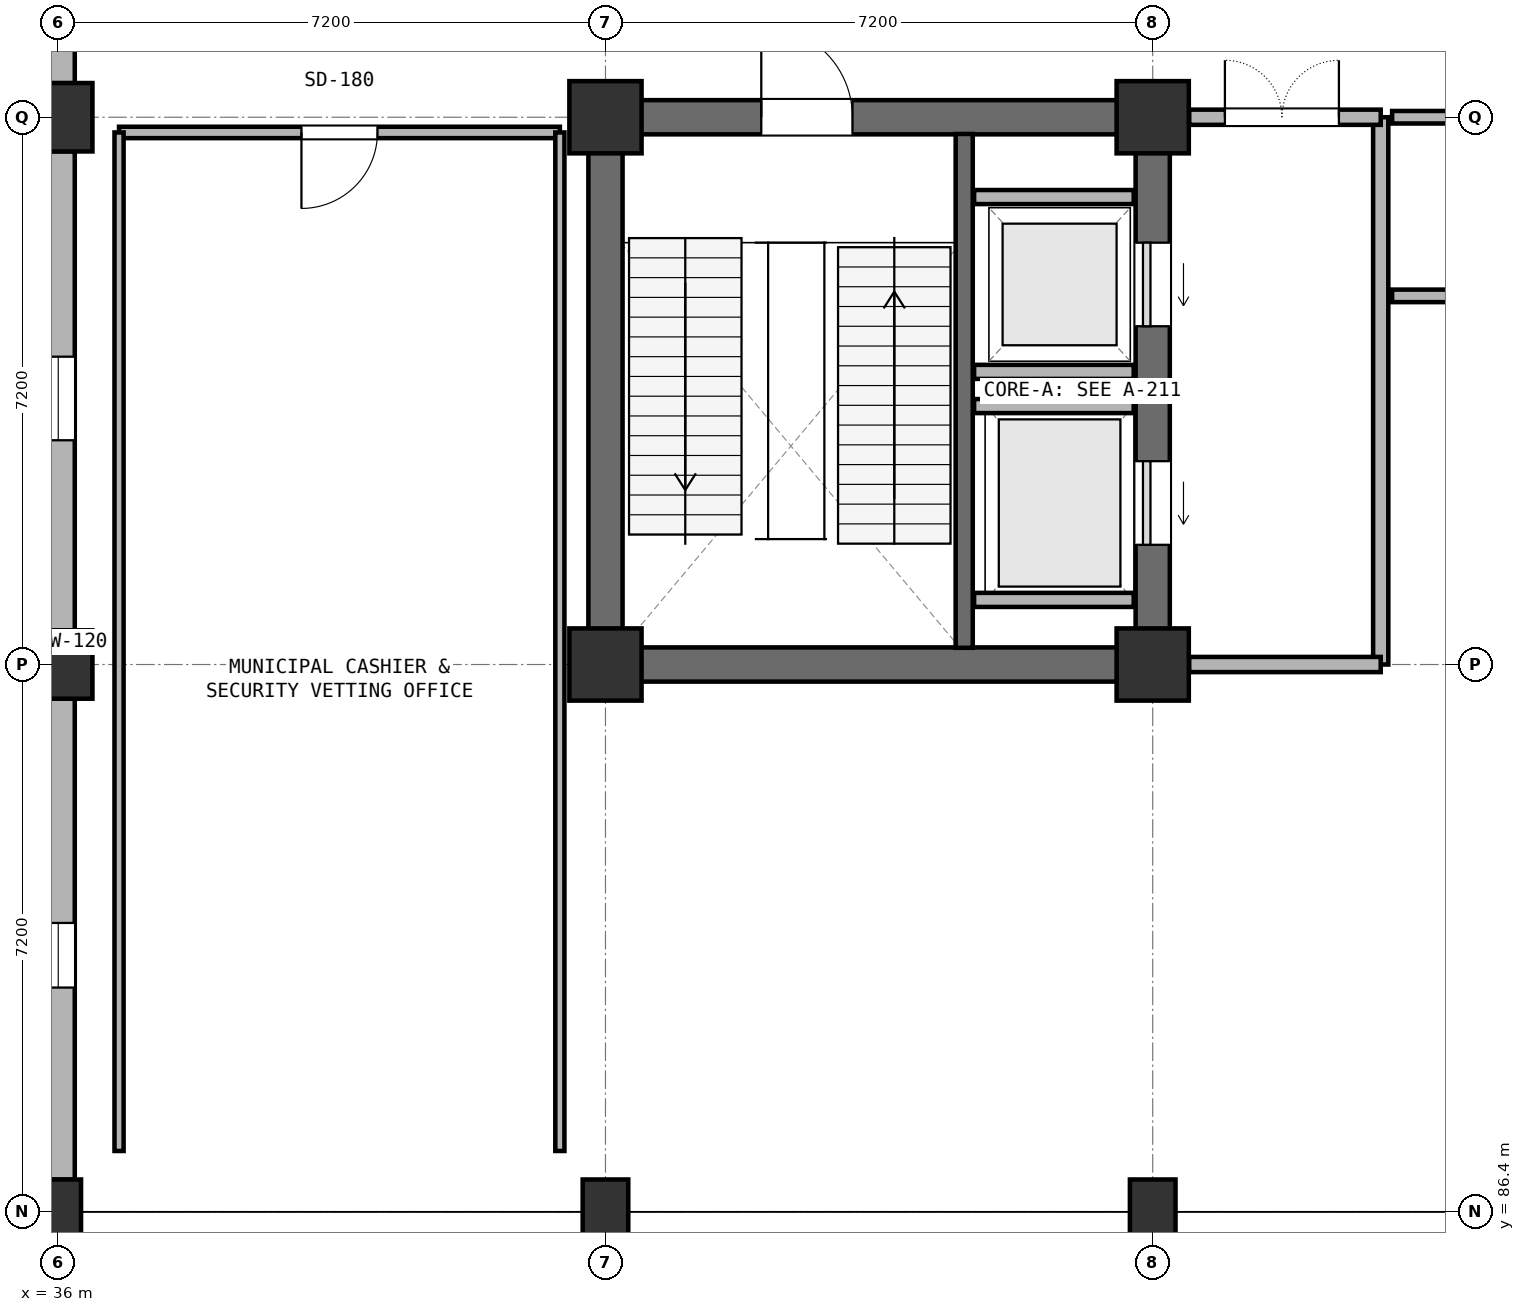
"""IFC4 building model, lengths in metres.
Left out: names, types, materials, properties, quantities, classifications, styles, units other than length and angle.
Written with IfcOpenShell. Run it as: python <this file> out.ifc"""

import sys

from ifc_helpers import new_model, si_unit, direction, frame, frame_2d, origin, origin_2d, place, context, subcontext, project, spatial, rectangle, extrude, element, fill, save


model = new_model("IFC4")
c1 = context("Model", 3, precision=1e-05, world=origin(), true_north=direction((0.0, 1.0)))
c2 = subcontext(c1, "Body", "Model", "MODEL_VIEW")
j1 = project(units=[si_unit("LENGTHUNIT", "METRE"), si_unit("PLANEANGLEUNIT", "RADIAN")], contexts=[c1])
p1 = place(None, origin())
s1 = spatial("IfcSite", under=j1, at=p1, CompositionType="ELEMENT")
p2 = place(p1, origin())
s2 = spatial("IfcBuilding", under=s1, at=p2, CompositionType="ELEMENT")
p3 = place(p2, origin())
s3 = spatial("IfcBuildingStorey", under=s2, at=p3, CompositionType="ELEMENT", Elevation=0.0)
p4 = place(p3, frame((36.0, 86.4, 0.0), z_axis=(0.0, 0.0, 1.0), x_axis=(1.0, 0.0, 0.0)))
e1 = element("IfcColumn", 1, at=p4, inside=s3, PredefinedType="COLUMN", context=c2, shape_type="SweptSolid", body=[
    extrude(rectangle(XDim=0.6, YDim=0.85, at=origin_2d()), origin(), (0.0, 0.0, 1.0), 5.4),
])
for number, where, z_axis, x_axis in (
    (2, (36.0, 93.6, 0.0), (0.0, 0.0, 1.0), (1.0, 0.0, 0.0)),
    (3, (36.0, 100.8, 0.0), (0.0, 0.0, 1.0), (1.0, 0.0, 0.0)),
):
    element("IfcColumn", number, at=place(p3, frame(where, z_axis=z_axis, x_axis=x_axis)), inside=s3, PredefinedType="COLUMN", context=c2, shape_type="SweptSolid", body=[
        extrude(rectangle(XDim=0.9, YDim=0.9, at=origin_2d()), origin(), (0.0, 0.0, 1.0), 5.4),
    ])
p5 = place(p3, frame((43.2, 86.4, 0.0), z_axis=(0.0, 0.0, 1.0), x_axis=(1.0, 0.0, 0.0)))
e4 = element("IfcColumn", 4, at=p5, inside=s3, PredefinedType="COLUMN", context=c2, shape_type="SweptSolid", body=[
    extrude(rectangle(XDim=0.6, YDim=0.85, at=origin_2d()), origin(), (0.0, 0.0, 1.0), 5.4),
])
for number, where, z_axis, x_axis in (
    (5, (43.2, 93.6, 0.0), (0.0, 0.0, 1.0), (1.0, 0.0, 0.0)),
    (6, (43.2, 100.8, 0.0), (0.0, 0.0, 1.0), (1.0, 0.0, 0.0)),
):
    element("IfcColumn", number, at=place(p3, frame(where, z_axis=z_axis, x_axis=x_axis)), inside=s3, PredefinedType="COLUMN", context=c2, shape_type="SweptSolid", body=[
        extrude(rectangle(XDim=0.95, YDim=0.95, at=origin_2d()), origin(), (0.0, 0.0, 1.0), 5.4),
    ])
p6 = place(p3, frame((50.4, 86.4, 0.0), z_axis=(0.0, 0.0, 1.0), x_axis=(1.0, 0.0, 0.0)))
e7 = element("IfcColumn", 7, at=p6, inside=s3, PredefinedType="COLUMN", context=c2, shape_type="SweptSolid", body=[
    extrude(rectangle(XDim=0.6, YDim=0.85, at=origin_2d()), origin(), (0.0, 0.0, 1.0), 5.4),
])
for number, where, z_axis, x_axis in (
    (8, (50.4, 93.6, 0.0), (0.0, 0.0, 1.0), (1.0, 0.0, 0.0)),
    (9, (50.4, 100.8, 0.0), (0.0, 0.0, 1.0), (1.0, 0.0, 0.0)),
):
    element("IfcColumn", number, at=place(p3, frame(where, z_axis=z_axis, x_axis=x_axis)), inside=s3, PredefinedType="COLUMN", context=c2, shape_type="SweptSolid", body=[
        extrude(rectangle(XDim=0.95, YDim=0.95, at=origin_2d()), origin(), (0.0, 0.0, 1.0), 5.4),
    ])
p7 = place(p3, frame((43.55, 93.6, 0.0), z_axis=(0.0, 0.0, 1.0), x_axis=(1.0, 0.0, 0.0)))
e10 = element("IfcWall", 10, at=p7, inside=s3, PredefinedType="SHEAR", context=c2, shape_type="SweptSolid", body=[
    extrude(rectangle(XDim=6.5, YDim=0.45, at=frame_2d((3.25, 0.0))), origin(), (0.0, 0.0, 1.0), 5.4),
])
p8 = place(p3, frame((50.4, 93.95, 0.0), z_axis=(0.0, 0.0, 1.0), x_axis=(0.0, 1.0, 0.0)))
e11 = element("IfcWall", 11, at=p8, inside=s3, PredefinedType="SHEAR", context=c2, shape_type="SweptSolid", body=[
    extrude(rectangle(XDim=6.5, YDim=0.45, at=frame_2d((3.25, 0.0))), origin(), (0.0, 0.0, 1.0), 5.4),
])
p9 = place(p8, frame((1.225, 0.0, 0.0)))
e12 = element("IfcOpeningElement", 12, at=p9, cuts=e11, PredefinedType="OPENING", context=c2, shape_type="SweptSolid", body=[
    extrude(rectangle(XDim=1.1, YDim=2.2, at=frame_2d((0.55, 1.1))), frame((0.0, 0.235, 0.0), z_axis=(0.0, -1.0, 0.0), x_axis=(1.0, 0.0, 0.0)), (0.0, 0.0, 1.0), 0.47),
])
p10 = place(p8, frame((4.1, 0.0, 0.0)))
e13 = element("IfcOpeningElement", 13, at=p10, cuts=e11, PredefinedType="OPENING", context=c2, shape_type="SweptSolid", body=[
    extrude(rectangle(XDim=1.1, YDim=2.2, at=frame_2d((0.55, 1.1))), frame((0.0, 0.235, 0.0), z_axis=(0.0, -1.0, 0.0), x_axis=(1.0, 0.0, 0.0)), (0.0, 0.0, 1.0), 0.47),
])
p11 = place(p3, frame((50.05, 100.8, 0.0), z_axis=(0.0, 0.0, 1.0), x_axis=(-1.0, 0.0, 0.0)))
e14 = element("IfcWall", 14, at=p11, inside=s3, PredefinedType="SHEAR", context=c2, shape_type="SweptSolid", body=[
    extrude(rectangle(XDim=6.5, YDim=0.45, at=frame_2d((3.25, 0.0))), origin(), (0.0, 0.0, 1.0), 5.4),
])
p12 = place(p11, frame((3.6, 0.0, 0.0)))
e15 = element("IfcOpeningElement", 15, at=p12, cuts=e14, PredefinedType="OPENING", context=c2, shape_type="SweptSolid", body=[
    extrude(rectangle(XDim=1.2, YDim=2.2, at=frame_2d((0.6, 1.1))), frame((0.0, 0.235, 0.0), z_axis=(0.0, -1.0, 0.0), x_axis=(1.0, 0.0, 0.0)), (0.0, 0.0, 1.0), 0.47),
])
p13 = place(p3, frame((43.2, 100.45, 0.0), z_axis=(0.0, 0.0, 1.0), x_axis=(0.0, -1.0, 0.0)))
e16 = element("IfcWall", 16, at=p13, inside=s3, PredefinedType="SHEAR", context=c2, shape_type="SweptSolid", body=[
    extrude(rectangle(XDim=6.5, YDim=0.45, at=frame_2d((3.25, 0.0))), origin(), (0.0, 0.0, 1.0), 5.4),
])
p14 = place(p3, frame((47.92, 93.82, 0.0), z_axis=(0.0, 0.0, 1.0), x_axis=(0.0, 1.0, 0.0)))
e17 = element("IfcWall", 17, at=p14, inside=s3, PredefinedType="SHEAR", context=c2, shape_type="SweptSolid", body=[
    extrude(rectangle(XDim=6.76, YDim=0.225, at=frame_2d((3.38, 0.0))), origin(), (0.0, 0.0, 1.0), 5.4),
])
for number, where, z_axis, x_axis in (
    (18, (48.05, 94.45, 0.0), (0.0, 0.0, 1.0), (1.0, 0.0, 0.0)),
    (19, (48.05, 97.0, 0.0), (0.0, 0.0, 1.0), (1.0, 0.0, 0.0)),
    (20, (48.05, 97.45, 0.0), (0.0, 0.0, 1.0), (1.0, 0.0, 0.0)),
    (21, (48.05, 99.75, 0.0), (0.0, 0.0, 1.0), (1.0, 0.0, 0.0)),
):
    element("IfcWall", number, at=place(p3, frame(where, z_axis=z_axis, x_axis=x_axis)), inside=s3, PredefinedType="PARTITIONING", context=c2, shape_type="SweptSolid", body=[
        extrude(rectangle(XDim=2.1, YDim=0.185, at=frame_2d((1.05, 0.0))), origin(), (0.0, 0.0, 1.0), 5.4),
    ])
p15 = place(p3, frame((36.0, 86.823, 0.0), z_axis=(0.0, 0.0, 1.0), x_axis=(0.0, 1.0, 0.0)))
e22 = element("IfcWall", 22, at=p15, inside=s3, PredefinedType="SOLIDWALL", context=c2, shape_type="SweptSolid", body=[
    extrude(rectangle(XDim=6.329, YDim=0.435, at=frame_2d((3.165, 0.0))), origin(), (0.0, 0.0, 1.0), 4.1),
])
p16 = place(p15, frame((2.527, 0.0, 0.7)))
e23 = element("IfcOpeningElement", 23, at=p16, cuts=e22, PredefinedType="OPENING", context=c2, shape_type="SweptSolid", body=[
    extrude(rectangle(XDim=0.85, YDim=2.2, at=frame_2d((0.425, 1.1))), frame((0.0, 0.228, 0.0), z_axis=(0.0, -1.0, 0.0), x_axis=(1.0, 0.0, 0.0)), (0.0, 0.0, 1.0), 0.455),
])
p17 = place(p3, frame((36.0, 94.048, 0.0), z_axis=(0.0, 0.0, 1.0), x_axis=(0.0, 1.0, 0.0)))
e24 = element("IfcWall", 24, at=p17, inside=s3, PredefinedType="SOLIDWALL", context=c2, shape_type="SweptSolid", body=[
    extrude(rectangle(XDim=6.304, YDim=0.435, at=frame_2d((3.152, 0.0))), origin(), (0.0, 0.0, 1.0), 4.1),
])
p18 = place(p17, frame((2.502, 0.0, 0.7)))
e25 = element("IfcOpeningElement", 25, at=p18, cuts=e24, PredefinedType="OPENING", context=c2, shape_type="SweptSolid", body=[
    extrude(rectangle(XDim=1.1, YDim=2.35, at=frame_2d((0.55, 1.175))), frame((0.0, 0.228, 0.0), z_axis=(0.0, -1.0, 0.0), x_axis=(1.0, 0.0, 0.0)), (0.0, 0.0, 1.0), 0.455),
])
p19 = place(p3, frame((36.0, 101.248, 0.0), z_axis=(0.0, 0.0, 1.0), x_axis=(0.0, 1.0, 0.0)))
e26 = element("IfcWall", 26, at=p19, inside=s3, PredefinedType="SOLIDWALL", context=c2, shape_type="SweptSolid", body=[
    extrude(rectangle(XDim=6.304, YDim=0.435, at=frame_2d((3.152, 0.0))), origin(), (0.0, 0.0, 1.0), 4.1),
])
p20 = place(p19, frame((0.602, 0.0, 0.0)))
e27 = element("IfcOpeningElement", 27, at=p20, cuts=e26, PredefinedType="OPENING", context=c2, shape_type="SweptSolid", body=[
    extrude(rectangle(XDim=1.6, YDim=2.2, at=frame_2d((0.8, 1.1))), frame((0.0, 0.228, 0.0), z_axis=(0.0, -1.0, 0.0), x_axis=(1.0, 0.0, 0.0)), (0.0, 0.0, 1.0), 0.455),
])
p21 = place(p3, frame((53.4, 93.6, 0.0), z_axis=(0.0, 0.0, 1.0), x_axis=(0.0, 1.0, 0.0)))
e28 = element("IfcWall", 28, at=p21, inside=s3, PredefinedType="PARTITIONING", context=c2, shape_type="SweptSolid", body=[
    extrude(rectangle(XDim=7.2, YDim=0.2, at=frame_2d((3.6, 0.0))), origin(), (0.0, 0.0, 1.0), 4.12),
])
p22 = place(p3, frame((50.88, 93.6, 0.0), z_axis=(0.0, 0.0, 1.0), x_axis=(1.0, 0.0, 0.0)))
e29 = element("IfcWall", 29, at=p22, inside=s3, PredefinedType="PARTITIONING", context=c2, shape_type="SweptSolid", body=[
    extrude(rectangle(XDim=2.52, YDim=0.2, at=frame_2d((1.26, 0.0))), origin(), (0.0, 0.0, 1.0), 4.12),
])
p23 = place(p3, frame((53.4, 100.8, 0.0), z_axis=(0.0, 0.0, 1.0), x_axis=(-1.0, 0.0, 0.0)))
e30 = element("IfcWall", 30, at=p23, inside=s3, PredefinedType="PARTITIONING", context=c2, shape_type="SweptSolid", body=[
    extrude(rectangle(XDim=2.52, YDim=0.2, at=frame_2d((1.26, 0.0))), origin(), (0.0, 0.0, 1.0), 4.12),
])
p24 = place(p23, frame((0.55, 0.0, 0.0)))
e31 = element("IfcOpeningElement", 31, at=p24, cuts=e30, PredefinedType="OPENING", context=c2, shape_type="SweptSolid", body=[
    extrude(rectangle(XDim=1.5, YDim=2.2, at=frame_2d((0.75, 1.1))), frame((0.0, 0.11, 0.0), z_axis=(0.0, -1.0, 0.0), x_axis=(1.0, 0.0, 0.0)), (0.0, 0.0, 1.0), 0.22),
])
p25 = place(p3, frame((56.75, 100.8, 0.0), z_axis=(0.0, 0.0, 1.0), x_axis=(-1.0, 0.0, 0.0)))
e32 = element("IfcWall", 32, at=p25, inside=s3, PredefinedType="PARTITIONING", context=c2, shape_type="SweptSolid", body=[
    extrude(rectangle(XDim=3.2, YDim=0.165, at=frame_2d((1.6, 0.0))), origin(), (0.0, 0.0, 1.0), 4.12),
])
p26 = place(p25, frame((0.95, 0.0, 0.0)))
e33 = element("IfcOpeningElement", 33, at=p26, cuts=e32, PredefinedType="OPENING", context=c2, shape_type="SweptSolid", body=[
    extrude(rectangle(XDim=0.95, YDim=2.15, at=frame_2d((0.475, 1.075))), frame((0.0, 0.093, 0.0), z_axis=(0.0, -1.0, 0.0), x_axis=(1.0, 0.0, 0.0)), (0.0, 0.0, 1.0), 0.185),
])
p27 = place(p3, frame((53.55, 98.45, 0.0), z_axis=(0.0, 0.0, 1.0), x_axis=(1.0, 0.0, 0.0)))
e34 = element("IfcWall", 34, at=p27, inside=s3, PredefinedType="PARTITIONING", context=c2, shape_type="SweptSolid", body=[
    extrude(rectangle(XDim=3.2, YDim=0.165, at=frame_2d((1.6, 0.0))), origin(), (0.0, 0.0, 1.0), 4.12),
])
p28 = place(p3, frame((42.6, 100.6, 0.0), z_axis=(0.0, 0.0, 1.0), x_axis=(-1.0, 0.0, 0.0)))
e35 = element("IfcWall", 35, at=p28, inside=s3, PredefinedType="PARTITIONING", context=c2, shape_type="SweptSolid", body=[
    extrude(rectangle(XDim=5.8, YDim=0.15, at=frame_2d((2.9, 0.0))), origin(), (0.0, 0.0, 1.0), 4.12),
])
p29 = place(p28, frame((2.4, 0.0, 0.0)))
e36 = element("IfcOpeningElement", 36, at=p29, cuts=e35, PredefinedType="OPENING", context=c2, shape_type="SweptSolid", body=[
    extrude(rectangle(XDim=1.0, YDim=2.15, at=frame_2d((0.5, 1.075))), frame((0.0, 0.085, 0.0), z_axis=(0.0, -1.0, 0.0), x_axis=(1.0, 0.0, 0.0)), (0.0, 0.0, 1.0), 0.17),
])
for number, where, z_axis, x_axis in (
    (37, (36.8, 87.2, 0.0), (0.0, 0.0, 1.0), (0.0, 1.0, 0.0)),
    (38, (42.6, 100.6, 0.0), (0.0, 0.0, 1.0), (0.0, -1.0, 0.0)),
):
    element("IfcWall", number, at=place(p3, frame(where, z_axis=z_axis, x_axis=x_axis)), inside=s3, PredefinedType="PARTITIONING", context=c2, shape_type="SweptSolid", body=[
        extrude(rectangle(XDim=13.4, YDim=0.12, at=frame_2d((6.7, 0.0))), origin(), (0.0, 0.0, 1.0), 4.12),
    ])
p30 = place(p9, origin())
e39 = element("IfcDoor", 39, at=p30, inside=s3, OperationType="SLIDING_TO_LEFT", PredefinedType="DOOR", context=c2, shape_type="SweptSolid", body=[
    extrude(rectangle(XDim=1.1, YDim=2.2, at=frame_2d((0.55, 1.1))), frame((0.0, 0.025, 0.0), z_axis=(0.0, -1.0, 0.0), x_axis=(1.0, 0.0, 0.0)), (0.0, 0.0, 1.0), 0.05),
])
fill(e12, e39)
p31 = place(p10, origin())
e40 = element("IfcDoor", 40, at=p31, inside=s3, OperationType="SLIDING_TO_LEFT", PredefinedType="DOOR", context=c2, shape_type="SweptSolid", body=[
    extrude(rectangle(XDim=1.1, YDim=2.2, at=frame_2d((0.55, 1.1))), frame((0.0, 0.025, 0.0), z_axis=(0.0, -1.0, 0.0), x_axis=(1.0, 0.0, 0.0)), (0.0, 0.0, 1.0), 0.05),
])
fill(e13, e40)
p32 = place(p16, origin())
e41 = element("IfcWindow", 41, at=p32, inside=s3, PartitioningType="SINGLE_PANEL", PredefinedType="WINDOW", context=c2, shape_type="SweptSolid", body=[
    extrude(rectangle(XDim=0.85, YDim=2.2, at=frame_2d((0.425, 1.1))), frame((0.0, 0.03, 0.0), z_axis=(0.0, -1.0, 0.0), x_axis=(1.0, 0.0, 0.0)), (0.0, 0.0, 1.0), 0.06),
])
fill(e23, e41)
p33 = place(p18, origin())
e42 = element("IfcWindow", 42, at=p33, inside=s3, PartitioningType="SINGLE_PANEL", PredefinedType="WINDOW", context=c2, shape_type="SweptSolid", body=[
    extrude(rectangle(XDim=1.1, YDim=2.35, at=frame_2d((0.55, 1.175))), frame((0.0, 0.03, 0.0), z_axis=(0.0, -1.0, 0.0), x_axis=(1.0, 0.0, 0.0)), (0.0, 0.0, 1.0), 0.06),
])
fill(e25, e42)
p34 = place(p12, frame((1.2, 0.0, 0.0), z_axis=(0.0, 0.0, 1.0), x_axis=(-1.0, 0.0, 0.0)))
e43 = element("IfcDoor", 43, at=p34, inside=s3, OperationType="SINGLE_SWING_LEFT", PredefinedType="DOOR", context=c2, shape_type="SweptSolid", body=[
    extrude(rectangle(XDim=1.2, YDim=2.2, at=frame_2d((0.6, 1.1))), frame((0.0, 0.025, 0.0), z_axis=(0.0, -1.0, 0.0), x_axis=(1.0, 0.0, 0.0)), (0.0, 0.0, 1.0), 0.05),
])
fill(e15, e43)
p35 = place(p24, frame((1.5, 0.0, 0.0), z_axis=(0.0, 0.0, 1.0), x_axis=(-1.0, 0.0, 0.0)))
e44 = element("IfcDoor", 44, at=p35, inside=s3, OperationType="DOUBLE_DOOR_SINGLE_SWING", PredefinedType="DOOR", context=c2, shape_type="SweptSolid", body=[
    extrude(rectangle(XDim=1.5, YDim=2.2, at=frame_2d((0.75, 1.1))), frame((0.0, 0.025, 0.0), z_axis=(0.0, -1.0, 0.0), x_axis=(1.0, 0.0, 0.0)), (0.0, 0.0, 1.0), 0.05),
])
fill(e31, e44)
p36 = place(p29, origin())
e45 = element("IfcDoor", 45, at=p36, inside=s3, OperationType="SINGLE_SWING_RIGHT", PredefinedType="DOOR", context=c2, shape_type="SweptSolid", body=[
    extrude(rectangle(XDim=1.0, YDim=2.15, at=frame_2d((0.5, 1.075))), frame((0.0, 0.025, 0.0), z_axis=(0.0, -1.0, 0.0), x_axis=(1.0, 0.0, 0.0)), (0.0, 0.0, 1.0), 0.05),
])
fill(e36, e45)
save(model, sys.argv[1])
